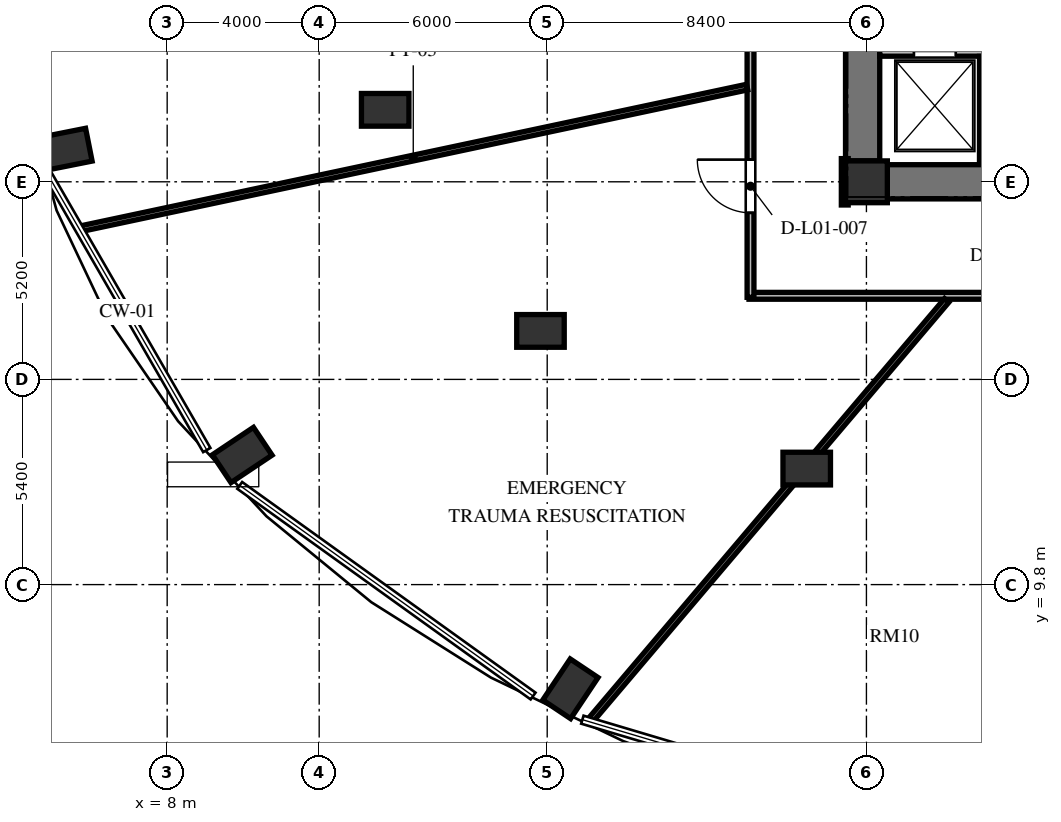
"""IFC4 building model, lengths in metres.
Left out: names, types, materials, properties, quantities, classifications, styles, units other than length and angle.
Written with IfcOpenShell. Run it as: python <this file> out.ifc"""

import sys

from ifc_helpers import new_model, si_unit, direction, frame, frame_2d, origin, origin_2d, place, context, subcontext, project, spatial, rectangle, extrude, element, fill, save


model = new_model("IFC4")
c1 = context("Model", 3, precision=1e-05, world=origin(), true_north=direction((0.0, 1.0)))
c2 = subcontext(c1, "Body", "Model", "MODEL_VIEW")
j1 = project(units=[si_unit("LENGTHUNIT", "METRE"), si_unit("PLANEANGLEUNIT", "RADIAN")], contexts=[c1])
p1 = place(None, origin())
s1 = spatial("IfcSite", under=j1, at=p1, CompositionType="ELEMENT")
p2 = place(p1, origin())
s2 = spatial("IfcBuilding", under=s1, at=p2, CompositionType="ELEMENT")
p3 = place(p2, frame((0.0, 0.0, 6.0)))
s3 = spatial("IfcBuildingStorey", under=s2, at=p3, CompositionType="ELEMENT", Elevation=6.0)
for number, where, z_axis, x_axis in (
    (1, (5.302, 21.25, 0.0), (0.0, 0.0, 1.0), (-0.981, -0.195, 0.0)),
    (2, (9.975, 13.211, 0.0), (0.0, 0.0, 1.0), (-0.831, -0.556, 0.0)),
    (3, (18.611, 7.058, 0.0), (0.0, 0.0, 1.0), (-0.556, -0.831, 0.0)),
):
    element("IfcColumn", number, at=place(p3, frame(where, z_axis=z_axis, x_axis=x_axis)), inside=s3, PredefinedType="COLUMN", context=c2, shape_type="SweptSolid", body=[
        extrude(rectangle(XDim=1.3, YDim=0.88, at=origin_2d()), origin(), (0.0, 0.0, 1.0), 4.8),
    ])
p4 = place(p3, frame((26.4, 20.4, 0.0), z_axis=(0.0, 0.0, 1.0), x_axis=(1.0, 0.0, 0.0)))
e4 = element("IfcColumn", 4, at=p4, inside=s3, PredefinedType="COLUMN", context=c2, shape_type="SweptSolid", body=[
    extrude(rectangle(XDim=1.1, YDim=1.1, at=origin_2d()), origin(), (0.0, 0.0, 1.0), 4.8),
])
for number, where, z_axis, x_axis in (
    (5, (13.737, 22.294, 0.0), (0.0, 0.0, 1.0), (1.0, 0.0, 0.0)),
    (6, (17.823, 16.476, 0.0), (0.0, 0.0, 1.0), (1.0, 0.0, 0.0)),
    (7, (24.829, 12.853, 0.0), (0.0, 0.0, 1.0), (1.0, 0.0, 0.0)),
):
    element("IfcColumn", number, at=place(p3, frame(where, z_axis=z_axis, x_axis=x_axis)), inside=s3, PredefinedType="COLUMN", context=c2, shape_type="SweptSolid", body=[
        extrude(rectangle(XDim=1.25, YDim=0.86, at=origin_2d()), origin(), (0.0, 0.0, 1.0), 4.8),
    ])
p5 = place(p3, frame((26.3, 20.95, 0.0), z_axis=(0.0, 0.0, 1.0), x_axis=(0.0, 1.0, 0.0)))
e8 = element("IfcWall", 8, at=p5, inside=s3, PredefinedType="SHEAR", context=c2, shape_type="SweptSolid", body=[
    extrude(rectangle(XDim=14.1, YDim=0.9, at=frame_2d((7.05, 0.0))), origin(), (0.0, 0.0, 1.0), 4.8),
])
p6 = place(p5, frame((6.5, 0.0, 0.0)))
e9 = element("IfcOpeningElement", 9, at=p6, cuts=e8, PredefinedType="OPENING", context=c2, shape_type="SweptSolid", body=[
    extrude(rectangle(XDim=1.2, YDim=2.15, at=frame_2d((0.6, 1.075))), frame((0.0, 0.46, 0.0), z_axis=(0.0, -1.0, 0.0), x_axis=(1.0, 0.0, 0.0)), (0.0, 0.0, 1.0), 0.92),
])
p7 = place(p5, frame((9.6, 0.0, 0.0)))
e10 = element("IfcOpeningElement", 10, at=p7, cuts=e8, PredefinedType="OPENING", context=c2, shape_type="SweptSolid", body=[
    extrude(rectangle(XDim=1.3, YDim=2.2, at=frame_2d((0.65, 1.1))), frame((0.0, 0.46, 0.0), z_axis=(0.0, -1.0, 0.0), x_axis=(1.0, 0.0, 0.0)), (0.0, 0.0, 1.0), 0.92),
])
p8 = place(p5, frame((3.26, 0.0, 0.0)))
e11 = element("IfcOpeningElement", 11, at=p8, cuts=e8, PredefinedType="OPENING", context=c2, shape_type="SweptSolid", body=[
    extrude(rectangle(XDim=1.3, YDim=2.2, at=frame_2d((0.65, 1.1))), frame((0.0, 0.46, 0.0), z_axis=(0.0, -1.0, 0.0), x_axis=(1.0, 0.0, 0.0)), (0.0, 0.0, 1.0), 0.92),
])
p9 = place(p3, frame((26.95, 20.4, 0.0), z_axis=(0.0, 0.0, 1.0), x_axis=(1.0, 0.0, 0.0)))
e12 = element("IfcWall", 12, at=p9, inside=s3, PredefinedType="SHEAR", context=c2, shape_type="SweptSolid", body=[
    extrude(rectangle(XDim=5.3, YDim=0.9, at=frame_2d((2.65, 0.0))), origin(), (0.0, 0.0, 1.0), 4.8),
])
p10 = place(p3, frame((26.75, 23.83, 0.0), z_axis=(0.0, 0.0, 1.0), x_axis=(1.0, 0.0, 0.0)))
e13 = element("IfcWall", 13, at=p10, inside=s3, PredefinedType="SOLIDWALL", context=c2, shape_type="SweptSolid", body=[
    extrude(rectangle(XDim=16.2, YDim=0.25, at=frame_2d((8.1, 0.0))), origin(), (0.0, 0.0, 1.0), 4.52),
])
p11 = place(p10, frame((0.9, 0.0, 0.0)))
e14 = element("IfcOpeningElement", 14, at=p11, cuts=e13, PredefinedType="OPENING", context=c2, shape_type="SweptSolid", body=[
    extrude(rectangle(XDim=1.1, YDim=2.2, at=frame_2d((0.55, 1.1))), frame((0.0, 0.135, 0.0), z_axis=(0.0, -1.0, 0.0), x_axis=(1.0, 0.0, 0.0)), (0.0, 0.0, 1.0), 0.27),
])
p12 = place(p10, frame((3.5, 0.0, 0.0)))
e15 = element("IfcOpeningElement", 15, at=p12, cuts=e13, PredefinedType="OPENING", context=c2, shape_type="SweptSolid", body=[
    extrude(rectangle(XDim=1.1, YDim=2.2, at=frame_2d((0.55, 1.1))), frame((0.0, 0.135, 0.0), z_axis=(0.0, -1.0, 0.0), x_axis=(1.0, 0.0, 0.0)), (0.0, 0.0, 1.0), 0.27),
])
p13 = place(p10, frame((6.3, 0.0, 0.0)))
e16 = element("IfcOpeningElement", 16, at=p13, cuts=e13, PredefinedType="OPENING", context=c2, shape_type="SweptSolid", body=[
    extrude(rectangle(XDim=1.1, YDim=2.2, at=frame_2d((0.55, 1.1))), frame((0.0, 0.135, 0.0), z_axis=(0.0, -1.0, 0.0), x_axis=(1.0, 0.0, 0.0)), (0.0, 0.0, 1.0), 0.27),
])
p14 = place(p10, frame((8.9, 0.0, 0.0)))
e17 = element("IfcOpeningElement", 17, at=p14, cuts=e13, PredefinedType="OPENING", context=c2, shape_type="SweptSolid", body=[
    extrude(rectangle(XDim=1.1, YDim=2.2, at=frame_2d((0.55, 1.1))), frame((0.0, 0.135, 0.0), z_axis=(0.0, -1.0, 0.0), x_axis=(1.0, 0.0, 0.0)), (0.0, 0.0, 1.0), 0.27),
])
p15 = place(p10, frame((11.7, 0.0, 0.0)))
e18 = element("IfcOpeningElement", 18, at=p15, cuts=e13, PredefinedType="OPENING", context=c2, shape_type="SweptSolid", body=[
    extrude(rectangle(XDim=1.1, YDim=2.2, at=frame_2d((0.55, 1.1))), frame((0.0, 0.135, 0.0), z_axis=(0.0, -1.0, 0.0), x_axis=(1.0, 0.0, 0.0)), (0.0, 0.0, 1.0), 0.27),
])
p16 = place(p10, frame((14.15, 0.0, 0.0)))
e19 = element("IfcOpeningElement", 19, at=p16, cuts=e13, PredefinedType="OPENING", context=c2, shape_type="SweptSolid", body=[
    extrude(rectangle(XDim=1.4, YDim=2.3, at=frame_2d((0.7, 1.15))), frame((0.0, 0.135, 0.0), z_axis=(0.0, -1.0, 0.0), x_axis=(1.0, 0.0, 0.0)), (0.0, 0.0, 1.0), 0.27),
])
p17 = place(p3, frame((29.5, 20.9, 0.0), z_axis=(0.0, 0.0, 1.0), x_axis=(0.0, 1.0, 0.0)))
e20 = element("IfcWall", 20, at=p17, inside=s3, PredefinedType="SOLIDWALL", context=c2, shape_type="SweptSolid", body=[
    extrude(rectangle(XDim=2.8, YDim=0.25, at=frame_2d((1.4, 0.0))), origin(), (0.0, 0.0, 1.0), 4.52),
])
p18 = place(p3, frame((25.83, 21.01, 0.0), z_axis=(0.0, 0.0, 1.0), x_axis=(0.0, -1.0, 0.0)))
e21 = element("IfcWall", 21, at=p18, inside=s3, PredefinedType="PARTITIONING", context=c2, shape_type="SweptSolid", body=[
    extrude(rectangle(XDim=1.22, YDim=0.18, at=frame_2d((0.61, 0.0))), origin(), (0.0, 0.0, 1.0), 4.52),
])
p19 = place(p3, frame((45.24, 17.4, 0.0), z_axis=(0.0, 0.0, 1.0), x_axis=(-1.0, 0.0, 0.0)))
e22 = element("IfcWall", 22, at=p19, inside=s3, PredefinedType="PARTITIONING", context=c2, shape_type="SweptSolid", body=[
    extrude(rectangle(XDim=21.93, YDim=0.18, at=frame_2d((10.965, 0.0))), origin(), (0.0, 0.0, 1.0), 4.52),
])
p20 = place(p19, frame((14.496, 0.0, 0.0)))
e23 = element("IfcOpeningElement", 23, at=p20, cuts=e22, PredefinedType="OPENING", context=c2, shape_type="SweptSolid", body=[
    extrude(rectangle(XDim=0.95, YDim=2.1, at=frame_2d((0.475, 1.05))), frame((0.0, 0.1, 0.0), z_axis=(0.0, -1.0, 0.0), x_axis=(1.0, 0.0, 0.0)), (0.0, 0.0, 1.0), 0.2),
])
p21 = place(p19, frame((8.49, 0.0, 0.0)))
e24 = element("IfcOpeningElement", 24, at=p21, cuts=e22, PredefinedType="OPENING", context=c2, shape_type="SweptSolid", body=[
    extrude(rectangle(XDim=0.95, YDim=2.1, at=frame_2d((0.475, 1.05))), frame((0.0, 0.1, 0.0), z_axis=(0.0, -1.0, 0.0), x_axis=(1.0, 0.0, 0.0)), (0.0, 0.0, 1.0), 0.2),
])
p22 = place(p19, frame((3.597, 0.0, 0.0)))
e25 = element("IfcOpeningElement", 25, at=p22, cuts=e22, PredefinedType="OPENING", context=c2, shape_type="SweptSolid", body=[
    extrude(rectangle(XDim=0.95, YDim=2.1, at=frame_2d((0.475, 1.05))), frame((0.0, 0.1, 0.0), z_axis=(0.0, -1.0, 0.0), x_axis=(1.0, 0.0, 0.0)), (0.0, 0.0, 1.0), 0.2),
])
p23 = place(p19, frame((1.141, 0.0, 0.0)))
e26 = element("IfcOpeningElement", 26, at=p23, cuts=e22, PredefinedType="OPENING", context=c2, shape_type="SweptSolid", body=[
    extrude(rectangle(XDim=1.4, YDim=2.2, at=frame_2d((0.7, 1.1))), frame((0.0, 0.1, 0.0), z_axis=(0.0, -1.0, 0.0), x_axis=(1.0, 0.0, 0.0)), (0.0, 0.0, 1.0), 0.2),
])
p24 = place(p3, frame((23.35, 17.36, 0.0), z_axis=(0.0, 0.0, 1.0), x_axis=(0.0, 1.0, 0.0)))
e27 = element("IfcWall", 27, at=p24, inside=s3, PredefinedType="PARTITIONING", context=c2, shape_type="SweptSolid", body=[
    extrude(rectangle(XDim=9.28, YDim=0.18, at=frame_2d((4.64, 0.0))), origin(), (0.0, 0.0, 1.0), 4.52),
])
p25 = place(p24, frame((2.224, 0.0, 0.0)))
e28 = element("IfcOpeningElement", 28, at=p25, cuts=e27, PredefinedType="OPENING", context=c2, shape_type="SweptSolid", body=[
    extrude(rectangle(XDim=1.4, YDim=2.2, at=frame_2d((0.7, 1.1))), frame((0.0, 0.1, 0.0), z_axis=(0.0, -1.0, 0.0), x_axis=(1.0, 0.0, 0.0)), (0.0, 0.0, 1.0), 0.2),
])
p26 = place(p3, frame((23.261, 22.892, 0.0), z_axis=(0.0, 0.0, 1.0), x_axis=(-0.978149523722, -0.207902643662, 0.0)))
e29 = element("IfcWall", 29, at=p26, inside=s3, PredefinedType="PARTITIONING", context=c2, shape_type="SweptSolid", body=[
    extrude(rectangle(XDim=17.963, YDim=0.15, at=frame_2d((8.982, 0.0))), origin(), (0.0, 0.0, 1.0), 4.52),
])
p27 = place(p3, frame((28.513, 17.279, 0.0), z_axis=(0.0, 0.0, 1.0), x_axis=(-0.646855904645, -0.762612246575, 0.0)))
e30 = element("IfcWall", 30, at=p27, inside=s3, PredefinedType="PARTITIONING", context=c2, shape_type="SweptSolid", body=[
    extrude(rectangle(XDim=14.546, YDim=0.15, at=frame_2d((7.273, 0.0))), origin(), (0.0, 0.0, 1.0), 3.805),
])
p28 = place(p25, origin())
e31 = element("IfcDoor", 31, at=p28, inside=s3, OperationType="SINGLE_SWING_RIGHT", PredefinedType="DOOR", context=c2, shape_type="SweptSolid", body=[
    extrude(rectangle(XDim=1.4, YDim=2.2, at=frame_2d((0.7, 1.1))), frame((0.0, 0.025, 0.0), z_axis=(0.0, -1.0, 0.0), x_axis=(1.0, 0.0, 0.0)), (0.0, 0.0, 1.0), 0.05),
])
fill(e28, e31)
save(model, sys.argv[1])
